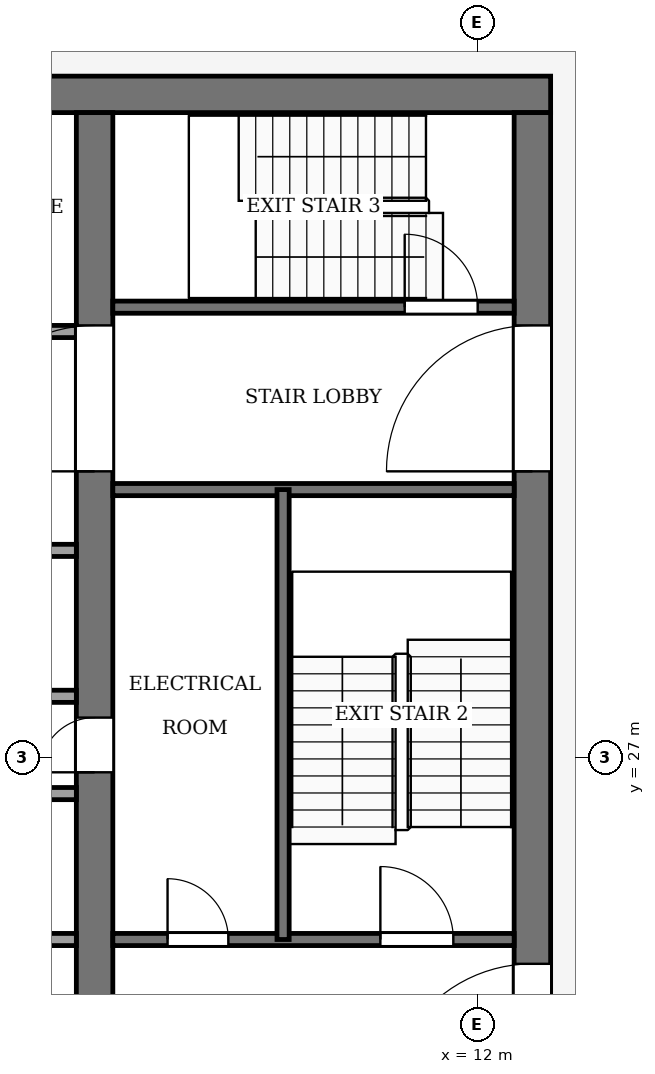
"""IFC4 building model, lengths in metres.
Left out: names, types, materials, properties, quantities, classifications, styles, units other than length and angle.
Written with IfcOpenShell. Run it as: python <this file> out.ifc"""

import sys

from ifc_helpers import new_model, si_unit, direction, frame, frame_2d, origin, place, context, subcontext, project, spatial, rectangle, extrude, element, fill, save


model = new_model("IFC4")
c1 = context("Model", 3, precision=1e-05, world=origin(), true_north=direction((0.0, 1.0)))
c2 = subcontext(c1, "Body", "Model", "MODEL_VIEW")
j1 = project(units=[si_unit("LENGTHUNIT", "METRE"), si_unit("PLANEANGLEUNIT", "RADIAN")], contexts=[c1])
p1 = place(None, origin())
s1 = spatial("IfcSite", under=j1, at=p1, CompositionType="ELEMENT")
p2 = place(p1, origin())
s2 = spatial("IfcBuilding", under=s1, at=p2, CompositionType="ELEMENT")
p3 = place(p2, frame((0.0, 0.0, 318.0)))
s3 = spatial("IfcBuildingStorey", under=s2, at=p3, CompositionType="ELEMENT", Elevation=318.0)
p4 = place(p3, frame((-13.2, 37.9, -0.13), z_axis=(0.0, 0.0, 1.0), x_axis=(1.0, 0.0, 0.0)))
e1 = element("IfcWall", 1, at=p4, inside=s3, PredefinedType="SHEAR", context=c2, shape_type="SweptSolid", body=[
    extrude(rectangle(XDim=26.4, YDim=0.6, at=frame_2d((13.2, 0.0))), origin(), (0.0, 0.0, 1.0), 4.0),
])
p5 = place(p3, frame((12.9, 18.4, -0.13), z_axis=(0.0, 0.0, 1.0), x_axis=(0.0, 1.0, 0.0)))
e2 = element("IfcWall", 2, at=p5, inside=s3, PredefinedType="SHEAR", context=c2, shape_type="SweptSolid", body=[
    extrude(rectangle(XDim=19.2, YDim=0.6, at=frame_2d((9.6, 0.0))), origin(), (0.0, 0.0, 1.0), 4.0),
])
p6 = place(p5, frame((2.8, 0.0, 0.13)))
e3 = element("IfcOpeningElement", 3, at=p6, cuts=e2, PredefinedType="OPENING", context=c2, shape_type="SweptSolid", body=[
    extrude(rectangle(XDim=2.4, YDim=2.4, at=frame_2d((1.2, 1.2))), frame((0.0, 0.31, 0.0), z_axis=(0.0, -1.0, 0.0), x_axis=(1.0, 0.0, 0.0)), (0.0, 0.0, 1.0), 0.62),
])
p7 = place(p5, frame((13.3, 0.0, 0.13)))
e4 = element("IfcOpeningElement", 4, at=p7, cuts=e2, PredefinedType="OPENING", context=c2, shape_type="SweptSolid", body=[
    extrude(rectangle(XDim=2.4, YDim=2.4, at=frame_2d((1.2, 1.2))), frame((0.0, 0.31, 0.0), z_axis=(0.0, -1.0, 0.0), x_axis=(1.0, 0.0, 0.0)), (0.0, 0.0, 1.0), 0.62),
])
p8 = place(p3, frame((5.7, 18.4, -0.13), z_axis=(0.0, 0.0, 1.0), x_axis=(0.0, 1.0, 0.0)))
e5 = element("IfcWall", 5, at=p8, inside=s3, PredefinedType="SHEAR", context=c2, shape_type="SweptSolid", body=[
    extrude(rectangle(XDim=19.2, YDim=0.6, at=frame_2d((9.6, 0.0))), origin(), (0.0, 0.0, 1.0), 4.0),
])
p9 = place(p8, frame((8.35, 0.0, 0.13)))
e6 = element("IfcOpeningElement", 6, at=p9, cuts=e5, PredefinedType="OPENING", context=c2, shape_type="SweptSolid", body=[
    extrude(rectangle(XDim=0.9, YDim=2.1, at=frame_2d((0.45, 1.05))), frame((0.0, 0.31, 0.0), z_axis=(0.0, -1.0, 0.0), x_axis=(1.0, 0.0, 0.0)), (0.0, 0.0, 1.0), 0.62),
])
p10 = place(p8, frame((13.3, 0.0, 0.13)))
e7 = element("IfcOpeningElement", 7, at=p10, cuts=e5, PredefinedType="OPENING", context=c2, shape_type="SweptSolid", body=[
    extrude(rectangle(XDim=2.4, YDim=2.4, at=frame_2d((1.2, 1.2))), frame((0.0, 0.31, 0.0), z_axis=(0.0, -1.0, 0.0), x_axis=(1.0, 0.0, 0.0)), (0.0, 0.0, 1.0), 0.62),
])
p11 = place(p3, frame((-5.4, 24.0, 0.0), z_axis=(0.0, 0.0, 1.0), x_axis=(1.0, 0.0, 0.0)))
e8 = element("IfcWall", 8, at=p11, inside=s3, PredefinedType="PARTITIONING", context=c2, shape_type="SweptSolid", body=[
    extrude(rectangle(XDim=10.8, YDim=0.2, at=frame_2d((5.4, 0.0))), origin(), (0.0, 0.0, 1.0), 3.87),
])
p12 = place(p11, frame((1.552, 0.0, 0.0)))
e9 = element("IfcOpeningElement", 9, at=p12, cuts=e8, PredefinedType="OPENING", context=c2, shape_type="SweptSolid", body=[
    extrude(rectangle(XDim=1.0, YDim=2.1, at=frame_2d((0.5, 1.05))), frame((0.0, 0.11, 0.0), z_axis=(0.0, -1.0, 0.0), x_axis=(1.0, 0.0, 0.0)), (0.0, 0.0, 1.0), 0.22),
])
p13 = place(p11, frame((6.952, 0.0, 0.0)))
e10 = element("IfcOpeningElement", 10, at=p13, cuts=e8, PredefinedType="OPENING", context=c2, shape_type="SweptSolid", body=[
    extrude(rectangle(XDim=1.0, YDim=2.1, at=frame_2d((0.5, 1.05))), frame((0.0, 0.11, 0.0), z_axis=(0.0, -1.0, 0.0), x_axis=(1.0, 0.0, 0.0)), (0.0, 0.0, 1.0), 0.22),
])
p14 = place(p3, frame((6.0, 24.0, 0.0), z_axis=(0.0, 0.0, 1.0), x_axis=(1.0, 0.0, 0.0)))
e11 = element("IfcWall", 11, at=p14, inside=s3, PredefinedType="PARTITIONING", context=c2, shape_type="SweptSolid", body=[
    extrude(rectangle(XDim=6.6, YDim=0.2, at=frame_2d((3.3, 0.0))), origin(), (0.0, 0.0, 1.0), 3.87),
])
p15 = place(p14, frame((0.9, 0.0, 0.0)))
e12 = element("IfcOpeningElement", 12, at=p15, cuts=e11, PredefinedType="OPENING", context=c2, shape_type="SweptSolid", body=[
    extrude(rectangle(XDim=1.0, YDim=2.1, at=frame_2d((0.5, 1.05))), frame((0.0, 0.11, 0.0), z_axis=(0.0, -1.0, 0.0), x_axis=(1.0, 0.0, 0.0)), (0.0, 0.0, 1.0), 0.22),
])
p16 = place(p14, frame((4.4, 0.0, 0.0)))
e13 = element("IfcOpeningElement", 13, at=p16, cuts=e11, PredefinedType="OPENING", context=c2, shape_type="SweptSolid", body=[
    extrude(rectangle(XDim=1.2, YDim=2.2, at=frame_2d((0.6, 1.1))), frame((0.0, 0.11, 0.0), z_axis=(0.0, -1.0, 0.0), x_axis=(1.0, 0.0, 0.0)), (0.0, 0.0, 1.0), 0.22),
])
for number, where, z_axis, x_axis in (
    (14, (-5.4, 26.4, 0.0), (0.0, 0.0, 1.0), (1.0, 0.0, 0.0)),
    (15, (-5.4, 28.0, 0.0), (0.0, 0.0, 1.0), (1.0, 0.0, 0.0)),
):
    element("IfcWall", number, at=place(p3, frame(where, z_axis=z_axis, x_axis=x_axis)), inside=s3, PredefinedType="PARTITIONING", context=c2, shape_type="SweptSolid", body=[
        extrude(rectangle(XDim=10.8, YDim=0.2, at=frame_2d((5.4, 0.0))), origin(), (0.0, 0.0, 1.0), 3.87),
    ])
p17 = place(p3, frame((-5.4, 30.4, 0.0), z_axis=(0.0, 0.0, 1.0), x_axis=(1.0, 0.0, 0.0)))
e16 = element("IfcWall", 16, at=p17, inside=s3, PredefinedType="PARTITIONING", context=c2, shape_type="SweptSolid", body=[
    extrude(rectangle(XDim=10.8, YDim=0.2, at=frame_2d((5.4, 0.0))), origin(), (0.0, 0.0, 1.0), 3.87),
])
p18 = place(p17, frame((2.47, 0.0, 0.0)))
e17 = element("IfcOpeningElement", 17, at=p18, cuts=e16, PredefinedType="OPENING", context=c2, shape_type="SweptSolid", body=[
    extrude(rectangle(XDim=1.0, YDim=2.1, at=frame_2d((0.5, 1.05))), frame((0.0, 0.11, 0.0), z_axis=(0.0, -1.0, 0.0), x_axis=(1.0, 0.0, 0.0)), (0.0, 0.0, 1.0), 0.22),
])
p19 = place(p17, frame((7.87, 0.0, 0.0)))
e18 = element("IfcOpeningElement", 18, at=p19, cuts=e16, PredefinedType="OPENING", context=c2, shape_type="SweptSolid", body=[
    extrude(rectangle(XDim=1.0, YDim=2.1, at=frame_2d((0.5, 1.05))), frame((0.0, 0.11, 0.0), z_axis=(0.0, -1.0, 0.0), x_axis=(1.0, 0.0, 0.0)), (0.0, 0.0, 1.0), 0.22),
])
p20 = place(p3, frame((6.0, 31.4, 0.0), z_axis=(0.0, 0.0, 1.0), x_axis=(1.0, 0.0, 0.0)))
e19 = element("IfcWall", 19, at=p20, inside=s3, PredefinedType="PARTITIONING", context=c2, shape_type="SweptSolid", body=[
    extrude(rectangle(XDim=6.6, YDim=0.2, at=frame_2d((3.3, 0.0))), origin(), (0.0, 0.0, 1.0), 3.87),
])
p21 = place(p3, frame((-5.4, 34.0, 0.0), z_axis=(0.0, 0.0, 1.0), x_axis=(1.0, 0.0, 0.0)))
e20 = element("IfcWall", 20, at=p21, inside=s3, PredefinedType="PARTITIONING", context=c2, shape_type="SweptSolid", body=[
    extrude(rectangle(XDim=10.8, YDim=0.2, at=frame_2d((5.4, 0.0))), origin(), (0.0, 0.0, 1.0), 3.87),
])
p22 = place(p21, frame((6.15, 0.0, 0.0)))
e21 = element("IfcOpeningElement", 21, at=p22, cuts=e20, PredefinedType="OPENING", context=c2, shape_type="SweptSolid", body=[
    extrude(rectangle(XDim=1.2, YDim=2.2, at=frame_2d((0.6, 1.1))), frame((0.0, 0.11, 0.0), z_axis=(0.0, -1.0, 0.0), x_axis=(1.0, 0.0, 0.0)), (0.0, 0.0, 1.0), 0.22),
])
p23 = place(p21, frame((8.95, 0.0, 0.0)))
e22 = element("IfcOpeningElement", 22, at=p23, cuts=e20, PredefinedType="OPENING", context=c2, shape_type="SweptSolid", body=[
    extrude(rectangle(XDim=1.0, YDim=2.1, at=frame_2d((0.5, 1.05))), frame((0.0, 0.11, 0.0), z_axis=(0.0, -1.0, 0.0), x_axis=(1.0, 0.0, 0.0)), (0.0, 0.0, 1.0), 0.22),
])
p24 = place(p3, frame((6.0, 34.4, 0.0), z_axis=(0.0, 0.0, 1.0), x_axis=(1.0, 0.0, 0.0)))
e23 = element("IfcWall", 23, at=p24, inside=s3, PredefinedType="PARTITIONING", context=c2, shape_type="SweptSolid", body=[
    extrude(rectangle(XDim=6.6, YDim=0.2, at=frame_2d((3.3, 0.0))), origin(), (0.0, 0.0, 1.0), 3.87),
])
p25 = place(p24, frame((4.8, 0.0, 0.0)))
e24 = element("IfcOpeningElement", 24, at=p25, cuts=e23, PredefinedType="OPENING", context=c2, shape_type="SweptSolid", body=[
    extrude(rectangle(XDim=1.2, YDim=2.2, at=frame_2d((0.6, 1.1))), frame((0.0, 0.11, 0.0), z_axis=(0.0, -1.0, 0.0), x_axis=(1.0, 0.0, 0.0)), (0.0, 0.0, 1.0), 0.22),
])
p26 = place(p3, frame((8.8, 24.0, 0.0), z_axis=(0.0, 0.0, 1.0), x_axis=(0.0, 1.0, 0.0)))
e25 = element("IfcWall", 25, at=p26, inside=s3, PredefinedType="PARTITIONING", context=c2, shape_type="SweptSolid", body=[
    extrude(rectangle(XDim=7.4, YDim=0.2, at=frame_2d((3.7, 0.0))), origin(), (0.0, 0.0, 1.0), 3.87),
])
p27 = place(p15, origin())
e26 = element("IfcDoor", 26, at=p27, inside=s3, OperationType="SINGLE_SWING_RIGHT", PredefinedType="DOOR", context=c2, shape_type="SweptSolid", body=[
    extrude(rectangle(XDim=1.0, YDim=2.1, at=frame_2d((0.5, 1.05))), frame((0.0, 0.025, 0.0), z_axis=(0.0, -1.0, 0.0), x_axis=(1.0, 0.0, 0.0)), (0.0, 0.0, 1.0), 0.05),
])
fill(e12, e26)
p28 = place(p9, origin())
e27 = element("IfcDoor", 27, at=p28, inside=s3, OperationType="SINGLE_SWING_RIGHT", PredefinedType="DOOR", context=c2, shape_type="SweptSolid", body=[
    extrude(rectangle(XDim=0.9, YDim=2.1, at=frame_2d((0.45, 1.05))), frame((0.0, 0.025, 0.0), z_axis=(0.0, -1.0, 0.0), x_axis=(1.0, 0.0, 0.0)), (0.0, 0.0, 1.0), 0.05),
])
fill(e6, e27)
p29 = place(p16, origin())
e28 = element("IfcDoor", 28, at=p29, inside=s3, OperationType="SINGLE_SWING_LEFT", PredefinedType="DOOR", context=c2, shape_type="SweptSolid", body=[
    extrude(rectangle(XDim=1.2, YDim=2.2, at=frame_2d((0.6, 1.1))), frame((0.0, 0.025, 0.0), z_axis=(0.0, -1.0, 0.0), x_axis=(1.0, 0.0, 0.0)), (0.0, 0.0, 1.0), 0.05),
])
fill(e13, e28)
p30 = place(p25, origin())
e29 = element("IfcDoor", 29, at=p30, inside=s3, OperationType="SINGLE_SWING_RIGHT", PredefinedType="DOOR", context=c2, shape_type="SweptSolid", body=[
    extrude(rectangle(XDim=1.2, YDim=2.2, at=frame_2d((0.6, 1.1))), frame((0.0, 0.025, 0.0), z_axis=(0.0, -1.0, 0.0), x_axis=(1.0, 0.0, 0.0)), (0.0, 0.0, 1.0), 0.05),
])
fill(e24, e29)
p31 = place(p10, origin())
e30 = element("IfcDoor", 30, at=p31, inside=s3, OperationType="DOUBLE_DOOR_SINGLE_SWING", PredefinedType="DOOR", context=c2, shape_type="SweptSolid", body=[
    extrude(rectangle(XDim=2.4, YDim=2.4, at=frame_2d((1.2, 1.2))), frame((0.0, 0.025, 0.0), z_axis=(0.0, -1.0, 0.0), x_axis=(1.0, 0.0, 0.0)), (0.0, 0.0, 1.0), 0.05),
])
fill(e7, e30)
p32 = place(p6, origin())
e31 = element("IfcDoor", 31, at=p32, inside=s3, OperationType="DOUBLE_DOOR_SINGLE_SWING", PredefinedType="DOOR", context=c2, shape_type="SweptSolid", body=[
    extrude(rectangle(XDim=2.4, YDim=2.4, at=frame_2d((1.2, 1.2))), frame((0.0, 0.025, 0.0), z_axis=(0.0, -1.0, 0.0), x_axis=(1.0, 0.0, 0.0)), (0.0, 0.0, 1.0), 0.05),
])
fill(e3, e31)
p33 = place(p7, origin())
e32 = element("IfcDoor", 32, at=p33, inside=s3, OperationType="DOUBLE_DOOR_SINGLE_SWING", PredefinedType="DOOR", context=c2, shape_type="SweptSolid", body=[
    extrude(rectangle(XDim=2.4, YDim=2.4, at=frame_2d((1.2, 1.2))), frame((0.0, 0.025, 0.0), z_axis=(0.0, -1.0, 0.0), x_axis=(1.0, 0.0, 0.0)), (0.0, 0.0, 1.0), 0.05),
])
fill(e4, e32)
save(model, sys.argv[1])
